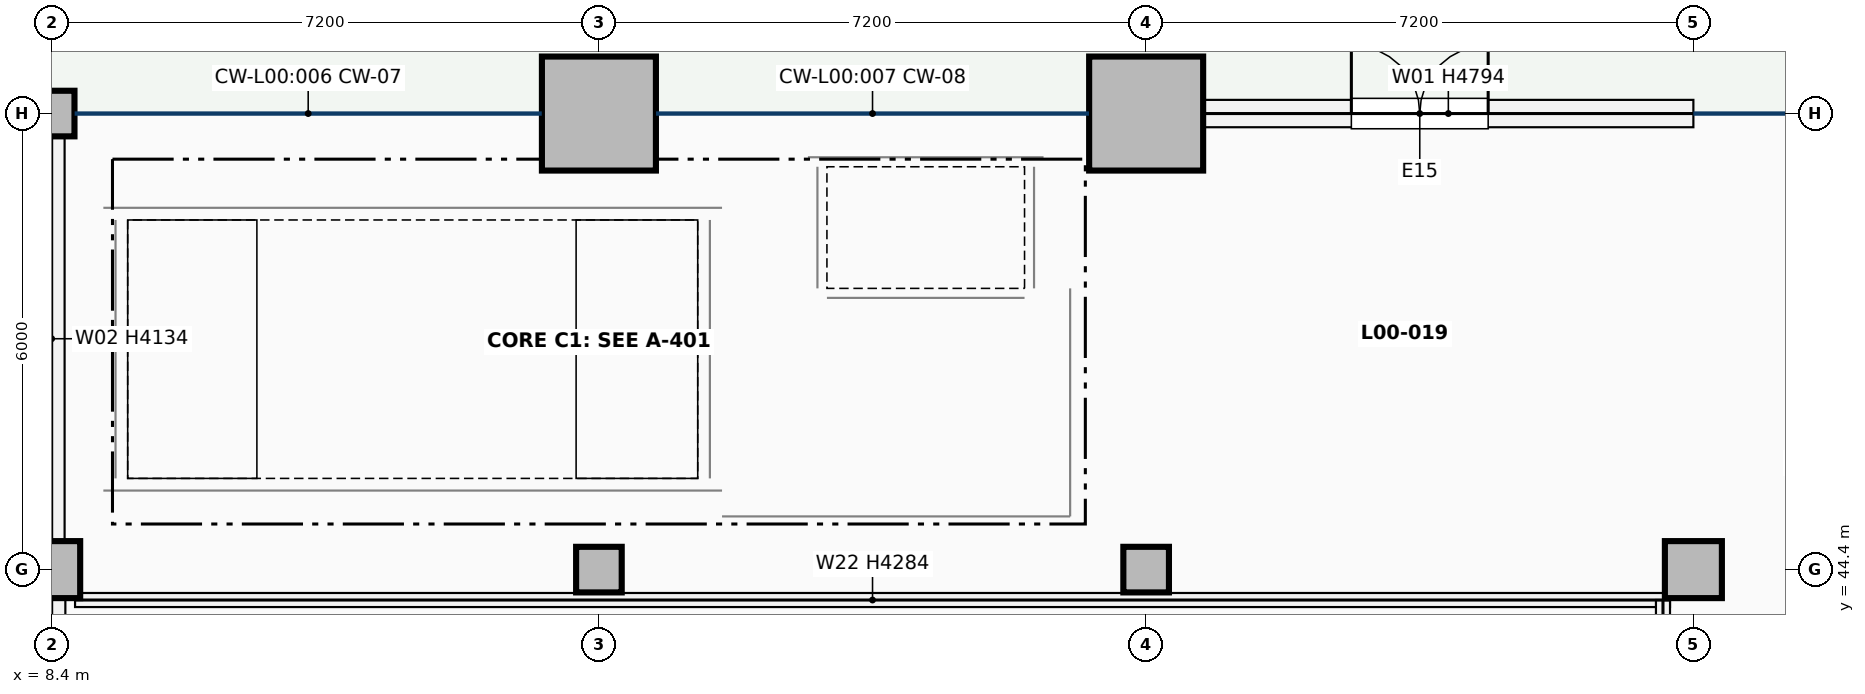
"""IFC4 building model, lengths in metres.
Left out: names, types, materials, properties, quantities, classifications, styles, units other than length and angle.
Written with IfcOpenShell. Run it as: python <this file> out.ifc"""

import sys

from ifc_helpers import new_model, si_unit, direction, frame, frame_2d, origin, origin_2d, place, context, subcontext, project, spatial, rectangle, extrude, element, fill, save


model = new_model("IFC4")
c1 = context("Model", 3, precision=1e-05, world=origin(), true_north=direction((0.0, 1.0)))
c2 = subcontext(c1, "Body", "Model", "MODEL_VIEW")
j1 = project(units=[si_unit("LENGTHUNIT", "METRE"), si_unit("PLANEANGLEUNIT", "RADIAN")], contexts=[c1])
p1 = place(None, origin())
s1 = spatial("IfcSite", under=j1, at=p1, CompositionType="ELEMENT")
p2 = place(p1, origin())
s2 = spatial("IfcBuilding", under=s1, at=p2, CompositionType="ELEMENT")
p3 = place(p2, origin())
s3 = spatial("IfcBuildingStorey", under=s2, at=p3, CompositionType="ELEMENT", Elevation=0.0)
p4 = place(p3, frame((8.4, 44.4, 0.0), z_axis=(0.0, 0.0, 1.0), x_axis=(1.0, 0.0, 0.0)))
e1 = element("IfcColumn", 1, at=p4, inside=s3, PredefinedType="COLUMN", context=c2, shape_type="SweptSolid", body=[
    extrude(rectangle(XDim=0.75, YDim=0.75, at=origin_2d()), origin(), (0.0, 0.0, 1.0), 5.1),
])
for number, where, z_axis, x_axis in (
    (2, (8.4, 50.4, 0.0), (0.0, 0.0, 1.0), (1.0, 0.0, 0.0)),
    (3, (15.6, 44.4, 0.0), (0.0, 0.0, 1.0), (1.0, 0.0, 0.0)),
):
    element("IfcColumn", number, at=place(p3, frame(where, z_axis=z_axis, x_axis=x_axis)), inside=s3, PredefinedType="COLUMN", context=c2, shape_type="SweptSolid", body=[
        extrude(rectangle(XDim=0.6, YDim=0.6, at=origin_2d()), origin(), (0.0, 0.0, 1.0), 5.1),
    ])
p5 = place(p3, frame((15.6, 50.4, 0.0), z_axis=(0.0, 0.0, 1.0), x_axis=(1.0, 0.0, 0.0)))
e4 = element("IfcColumn", 4, at=p5, inside=s3, PredefinedType="COLUMN", context=c2, shape_type="SweptSolid", body=[
    extrude(rectangle(XDim=1.5, YDim=1.5, at=origin_2d()), origin(), (0.0, 0.0, 1.0), 5.1),
])
p6 = place(p3, frame((22.8, 44.4, 0.0), z_axis=(0.0, 0.0, 1.0), x_axis=(1.0, 0.0, 0.0)))
e5 = element("IfcColumn", 5, at=p6, inside=s3, PredefinedType="COLUMN", context=c2, shape_type="SweptSolid", body=[
    extrude(rectangle(XDim=0.6, YDim=0.6, at=origin_2d()), origin(), (0.0, 0.0, 1.0), 5.1),
])
p7 = place(p3, frame((22.8, 50.4, 0.0), z_axis=(0.0, 0.0, 1.0), x_axis=(1.0, 0.0, 0.0)))
e6 = element("IfcColumn", 6, at=p7, inside=s3, PredefinedType="COLUMN", context=c2, shape_type="SweptSolid", body=[
    extrude(rectangle(XDim=1.5, YDim=1.5, at=origin_2d()), origin(), (0.0, 0.0, 1.0), 5.1),
])
p8 = place(p3, frame((30.0, 44.4, 0.0), z_axis=(0.0, 0.0, 1.0), x_axis=(1.0, 0.0, 0.0)))
e7 = element("IfcColumn", 7, at=p8, inside=s3, PredefinedType="COLUMN", context=c2, shape_type="SweptSolid", body=[
    extrude(rectangle(XDim=0.75, YDim=0.75, at=origin_2d()), origin(), (0.0, 0.0, 1.0), 5.1),
])
p9 = place(p3, frame((8.4, 37.577, 0.0), z_axis=(0.0, 0.0, 1.0), x_axis=(0.0, 1.0, 0.0)))
e8 = element("IfcWall", 8, at=p9, inside=s3, PredefinedType="SOLIDWALL", context=c2, shape_type="SweptSolid", body=[
    extrude(rectangle(XDim=6.446, YDim=0.36, at=frame_2d((3.223, 0.0))), origin(), (0.0, 0.0, 1.0), 4.134),
])
p10 = place(p3, frame((8.4, 44.777, 0.0), z_axis=(0.0, 0.0, 1.0), x_axis=(0.0, 1.0, 0.0)))
e9 = element("IfcWall", 9, at=p10, inside=s3, PredefinedType="SOLIDWALL", context=c2, shape_type="SweptSolid", body=[
    extrude(rectangle(XDim=5.321, YDim=0.34, at=frame_2d((2.66, 0.0))), origin(), (0.0, 0.0, 1.0), 4.134),
])
p11 = place(p3, frame((23.552, 50.4, 0.0), z_axis=(0.0, 0.0, 1.0), x_axis=(1.0, 0.0, 0.0)))
e10 = element("IfcWall", 10, at=p11, inside=s3, PredefinedType="SOLIDWALL", context=c2, shape_type="SweptSolid", body=[
    extrude(rectangle(XDim=6.448, YDim=0.36, at=frame_2d((3.224, 0.0))), origin(), (0.0, 0.0, 1.0), 4.794),
])
p12 = place(p11, frame((1.948, 0.0, 0.0)))
e11 = element("IfcOpeningElement", 11, at=p12, cuts=e10, PredefinedType="OPENING", context=c2, shape_type="SweptSolid", body=[
    extrude(rectangle(XDim=1.8, YDim=2.3, at=frame_2d((0.9, 1.15))), frame((0.0, 0.19, 0.0), z_axis=(0.0, -1.0, 0.0), x_axis=(1.0, 0.0, 0.0)), (0.0, 0.0, 1.0), 0.38),
])
p13 = place(p3, frame((9.24, 45.6, 0.0), z_axis=(0.0, 0.0, 1.0), x_axis=(0.0, 1.0, 0.0)))
e12 = element("IfcWall", 12, at=p13, inside=s3, PredefinedType="SHEAR", context=c2, shape_type="SweptSolid", body=[
    extrude(rectangle(XDim=3.4, YDim=0.32, at=frame_2d((1.7, 0.0))), origin(), (0.0, 0.0, 1.0), 5.1),
])
for number, where, z_axis, x_axis in (
    (13, (9.08, 45.44, 0.0), (0.0, 0.0, 1.0), (1.0, 0.0, 0.0)),
    (14, (9.08, 49.16, 0.0), (0.0, 0.0, 1.0), (1.0, 0.0, 0.0)),
):
    element("IfcWall", number, at=place(p3, frame(where, z_axis=z_axis, x_axis=x_axis)), inside=s3, PredefinedType="SHEAR", context=c2, shape_type="SweptSolid", body=[
        extrude(rectangle(XDim=8.14, YDim=0.32, at=frame_2d((4.07, 0.0))), origin(), (0.0, 0.0, 1.0), 5.1),
    ])
p14 = place(p3, frame((17.06, 45.6, 0.0), z_axis=(0.0, 0.0, 1.0), x_axis=(0.0, 1.0, 0.0)))
e15 = element("IfcWall", 15, at=p14, inside=s3, PredefinedType="SHEAR", context=c2, shape_type="SweptSolid", body=[
    extrude(rectangle(XDim=3.4, YDim=0.32, at=frame_2d((1.7, 0.0))), origin(), (0.0, 0.0, 1.0), 5.1),
])
p15 = place(p14, frame((0.65, 0.0, 0.0)))
e16 = element("IfcOpeningElement", 16, at=p15, cuts=e15, PredefinedType="OPENING", context=c2, shape_type="SweptSolid", body=[
    extrude(rectangle(XDim=1.2, YDim=2.2, at=frame_2d((0.6, 1.1))), frame((0.0, 0.17, 0.0), z_axis=(0.0, -1.0, 0.0), x_axis=(1.0, 0.0, 0.0)), (0.0, 0.0, 1.0), 0.34),
])
for number, where, z_axis, x_axis in (
    (17, (18.475, 48.1, 0.0), (0.0, 0.0, 1.0), (0.0, 1.0, 0.0)),
    (18, (21.325, 48.1, 0.0), (0.0, 0.0, 1.0), (0.0, 1.0, 0.0)),
):
    element("IfcWall", number, at=place(p3, frame(where, z_axis=z_axis, x_axis=x_axis)), inside=s3, PredefinedType="SHEAR", context=c2, shape_type="SweptSolid", body=[
        extrude(rectangle(XDim=1.6, YDim=0.25, at=frame_2d((0.8, 0.0))), origin(), (0.0, 0.0, 1.0), 5.1),
    ])
p16 = place(p3, frame((18.35, 49.825, 0.0), z_axis=(0.0, 0.0, 1.0), x_axis=(1.0, 0.0, 0.0)))
e19 = element("IfcWall", 19, at=p16, inside=s3, PredefinedType="SHEAR", context=c2, shape_type="SweptSolid", body=[
    extrude(rectangle(XDim=3.1, YDim=0.25, at=frame_2d((1.55, 0.0))), origin(), (0.0, 0.0, 1.0), 5.1),
])
p17 = place(p3, frame((18.6, 47.975, 0.0), z_axis=(0.0, 0.0, 1.0), x_axis=(1.0, 0.0, 0.0)))
e20 = element("IfcWall", 20, at=p17, inside=s3, PredefinedType="SHEAR", context=c2, shape_type="SweptSolid", body=[
    extrude(rectangle(XDim=2.6, YDim=0.25, at=frame_2d((1.3, 0.0))), origin(), (0.0, 0.0, 1.0), 5.1),
])
p18 = place(p17, frame((0.75, 0.0, 0.0)))
e21 = element("IfcOpeningElement", 21, at=p18, cuts=e20, PredefinedType="OPENING", context=c2, shape_type="SweptSolid", body=[
    extrude(rectangle(XDim=1.1, YDim=2.15, at=frame_2d((0.55, 1.075))), frame((0.0, 0.135, 0.0), z_axis=(0.0, -1.0, 0.0), x_axis=(1.0, 0.0, 0.0)), (0.0, 0.0, 1.0), 0.27),
])
p19 = place(p3, frame((21.8, 45.1, 0.0), z_axis=(0.0, 0.0, 1.0), x_axis=(0.0, 1.0, 0.0)))
e22 = element("IfcWall", 22, at=p19, inside=s3, PredefinedType="PARTITIONING", context=c2, shape_type="SweptSolid", body=[
    extrude(rectangle(XDim=3.0, YDim=0.2, at=frame_2d((1.5, 0.0))), origin(), (0.0, 0.0, 1.0), 4.774),
])
p20 = place(p19, frame((0.775, 0.0, 0.0)))
e23 = element("IfcOpeningElement", 23, at=p20, cuts=e22, PredefinedType="OPENING", context=c2, shape_type="SweptSolid", body=[
    extrude(rectangle(XDim=1.45, YDim=2.2, at=frame_2d((0.725, 1.1))), frame((0.0, 0.11, 0.0), z_axis=(0.0, -1.0, 0.0), x_axis=(1.0, 0.0, 0.0)), (0.0, 0.0, 1.0), 0.22),
])
p21 = place(p3, frame((17.22, 45.1, 0.0), z_axis=(0.0, 0.0, 1.0), x_axis=(1.0, 0.0, 0.0)))
e24 = element("IfcWall", 24, at=p21, inside=s3, PredefinedType="PARTITIONING", context=c2, shape_type="SweptSolid", body=[
    extrude(rectangle(XDim=4.58, YDim=0.2, at=frame_2d((2.29, 0.0))), origin(), (0.0, 0.0, 1.0), 4.774),
])
p22 = place(p3, frame((8.708, 44.0, 0.0), z_axis=(0.0, 0.0, 1.0), x_axis=(1.0, 0.0, 0.0)))
e25 = element("IfcWall", 25, at=p22, inside=s3, PredefinedType="PARTITIONING", context=c2, shape_type="SweptSolid", body=[
    extrude(rectangle(XDim=20.985, YDim=0.185, at=frame_2d((10.492, 0.0))), origin(), (0.0, 0.0, 1.0), 4.284),
])
p23 = place(p3, frame((29.6, 8.8, 0.0), z_axis=(0.0, 0.0, 1.0), x_axis=(0.0, 1.0, 0.0)))
e26 = element("IfcWall", 26, at=p23, inside=s3, PredefinedType="PARTITIONING", context=c2, shape_type="SweptSolid", body=[
    extrude(rectangle(XDim=35.2, YDim=0.185, at=frame_2d((17.6, 0.0))), origin(), (0.0, 0.0, 1.0), 4.774),
])
p24 = place(p23, frame((16.76, 0.0, 0.0)))
e27 = element("IfcOpeningElement", 27, at=p24, cuts=e26, PredefinedType="OPENING", context=c2, shape_type="SweptSolid", body=[
    extrude(rectangle(XDim=1.68, YDim=2.36, at=frame_2d((0.84, 1.18))), frame((0.0, 0.103, 0.0), z_axis=(0.0, -1.0, 0.0), x_axis=(1.0, 0.0, 0.0)), (0.0, 0.0, 1.0), 0.205),
])
p25 = place(p12, origin())
e28 = element("IfcDoor", 28, at=p25, inside=s3, OperationType="DOUBLE_DOOR_SINGLE_SWING", PredefinedType="DOOR", context=c2, shape_type="SweptSolid", body=[
    extrude(rectangle(XDim=1.8, YDim=2.3, at=frame_2d((0.9, 1.15))), frame((0.0, 0.025, 0.0), z_axis=(0.0, -1.0, 0.0), x_axis=(1.0, 0.0, 0.0)), (0.0, 0.0, 1.0), 0.05),
])
fill(e11, e28)
p26 = place(p15, frame((1.2, 0.0, 0.0), z_axis=(0.0, 0.0, 1.0), x_axis=(-1.0, 0.0, 0.0)))
e29 = element("IfcDoor", 29, at=p26, inside=s3, OperationType="SINGLE_SWING_LEFT", PredefinedType="DOOR", context=c2, shape_type="SweptSolid", body=[
    extrude(rectangle(XDim=1.2, YDim=2.2, at=frame_2d((0.6, 1.1))), frame((0.0, 0.025, 0.0), z_axis=(0.0, -1.0, 0.0), x_axis=(1.0, 0.0, 0.0)), (0.0, 0.0, 1.0), 0.05),
])
fill(e16, e29)
p27 = place(p18, origin())
e30 = element("IfcDoor", 30, at=p27, inside=s3, OperationType="DOUBLE_DOOR_SLIDING", PredefinedType="DOOR", context=c2, shape_type="SweptSolid", body=[
    extrude(rectangle(XDim=1.1, YDim=2.15, at=frame_2d((0.55, 1.075))), frame((0.0, 0.025, 0.0), z_axis=(0.0, -1.0, 0.0), x_axis=(1.0, 0.0, 0.0)), (0.0, 0.0, 1.0), 0.05),
])
fill(e21, e30)
p28 = place(p20, frame((1.45, 0.0, 0.0), z_axis=(0.0, 0.0, 1.0), x_axis=(-1.0, 0.0, 0.0)))
e31 = element("IfcDoor", 31, at=p28, inside=s3, OperationType="DOUBLE_DOOR_SINGLE_SWING", PredefinedType="DOOR", context=c2, shape_type="SweptSolid", body=[
    extrude(rectangle(XDim=1.45, YDim=2.2, at=frame_2d((0.725, 1.1))), frame((0.0, 0.025, 0.0), z_axis=(0.0, -1.0, 0.0), x_axis=(1.0, 0.0, 0.0)), (0.0, 0.0, 1.0), 0.05),
])
fill(e23, e31)
save(model, sys.argv[1])
